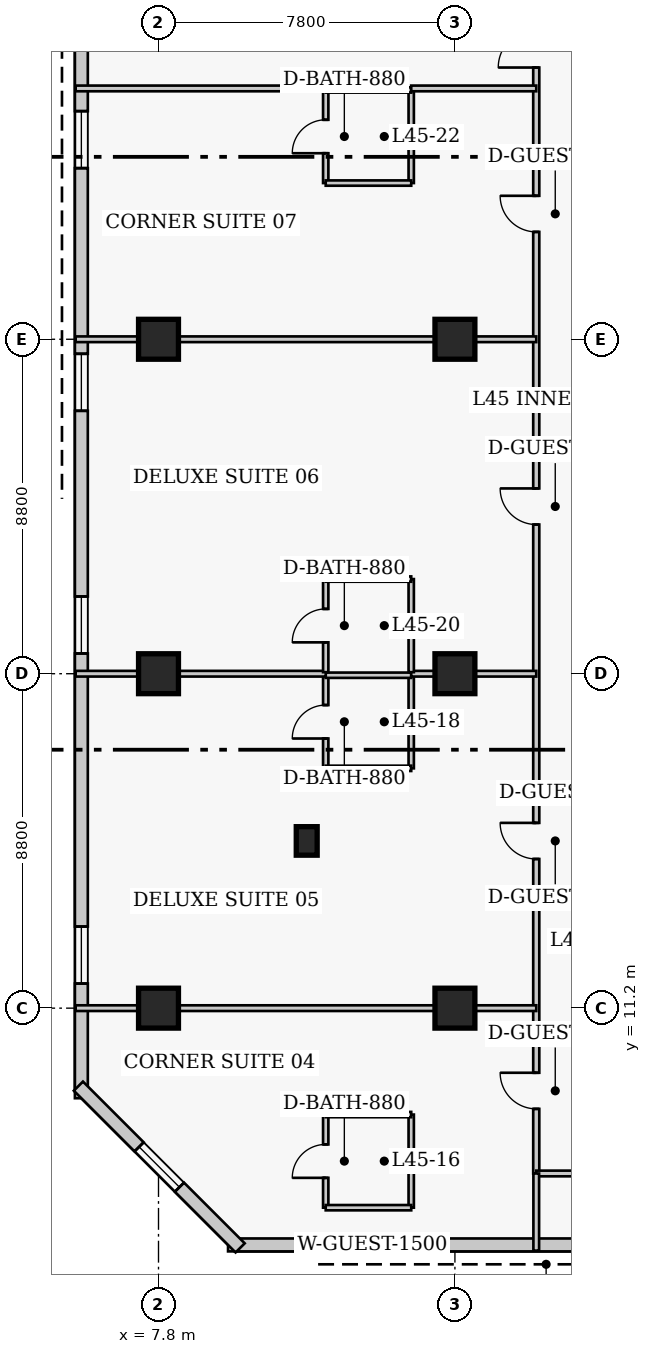
"""IFC4 building model, lengths in metres.
Left out: names, types, materials, properties, quantities, classifications, styles, units other than length and angle.
Written with IfcOpenShell. Run it as: python <this file> out.ifc"""

import sys

from ifc_helpers import new_model, si_unit, direction, frame, frame_2d, origin, origin_2d, place, context, subcontext, project, spatial, rectangle, extrude, element, fill, save


model = new_model("IFC4")
c1 = context("Model", 3, precision=1e-05, world=origin(), true_north=direction((0.0, 1.0)))
c2 = subcontext(c1, "Body", "Model", "MODEL_VIEW")
j1 = project(units=[si_unit("LENGTHUNIT", "METRE"), si_unit("PLANEANGLEUNIT", "RADIAN")], contexts=[c1])
p1 = place(None, origin())
s1 = spatial("IfcSite", under=j1, at=p1, CompositionType="ELEMENT")
p2 = place(p1, origin())
s2 = spatial("IfcBuilding", under=s1, at=p2, CompositionType="ELEMENT")
p3 = place(p2, frame((0.0, 0.0, 180.2)))
s3 = spatial("IfcBuildingStorey", under=s2, at=p3, CompositionType="ELEMENT", Elevation=180.2)
for number, where, z_axis, x_axis in (
    (1, (7.8, 11.2, 0.0), (0.0, 0.0, 1.0), (1.0, 0.0, 0.0)),
    (2, (7.8, 20.0, 0.0), (0.0, 0.0, 1.0), (1.0, 0.0, 0.0)),
    (3, (7.8, 28.8, 0.0), (0.0, 0.0, 1.0), (1.0, 0.0, 0.0)),
    (4, (15.6, 11.2, 0.0), (0.0, 0.0, 1.0), (1.0, 0.0, 0.0)),
    (5, (15.6, 20.0, 0.0), (0.0, 0.0, 1.0), (1.0, 0.0, 0.0)),
    (6, (15.6, 28.8, 0.0), (0.0, 0.0, 1.0), (1.0, 0.0, 0.0)),
):
    element("IfcColumn", number, at=place(p3, frame(where, z_axis=z_axis, x_axis=x_axis)), inside=s3, PredefinedType="COLUMN", context=c2, shape_type="SweptSolid", body=[
        extrude(rectangle(XDim=1.05, YDim=1.05, at=origin_2d()), origin(), (0.0, 0.0, 1.0), 3.8),
    ])
p4 = place(p3, frame((11.7, 15.6, 0.0), z_axis=(0.0, 0.0, 1.0), x_axis=(1.0, 0.0, 0.0)))
e7 = element("IfcColumn", 7, at=p4, inside=s3, PredefinedType="PILASTER", context=c2, shape_type="SweptSolid", body=[
    extrude(rectangle(XDim=0.55, YDim=0.75, at=origin_2d()), origin(), (0.0, 0.0, 1.0), 3.8),
])
p5 = place(p3, frame((9.63, 4.97, 0.0), z_axis=(0.0, 0.0, 1.0), x_axis=(1.0, 0.0, 0.0)))
e8 = element("IfcWall", 8, at=p5, inside=s3, PredefinedType="SOLIDWALL", context=c2, shape_type="SweptSolid", body=[
    extrude(rectangle(XDim=26.69, YDim=0.34, at=frame_2d((13.345, 0.0))), origin(), (0.0, 0.0, 1.0), 3.42),
])
p6 = place(p5, frame((3.048, 0.0, 0.85)))
e9 = element("IfcOpeningElement", 9, at=p6, cuts=e8, PredefinedType="OPENING", context=c2, shape_type="SweptSolid", body=[
    extrude(rectangle(XDim=1.5, YDim=1.75, at=frame_2d((0.75, 0.875))), frame((0.0, 0.18, 0.0), z_axis=(0.0, -1.0, 0.0), x_axis=(1.0, 0.0, 0.0)), (0.0, 0.0, 1.0), 0.36),
])
p7 = place(p5, frame((22.642, 0.0, 0.85)))
e10 = element("IfcOpeningElement", 10, at=p7, cuts=e8, PredefinedType="OPENING", context=c2, shape_type="SweptSolid", body=[
    extrude(rectangle(XDim=1.5, YDim=1.75, at=frame_2d((0.75, 0.875))), frame((0.0, 0.18, 0.0), z_axis=(0.0, -1.0, 0.0), x_axis=(1.0, 0.0, 0.0)), (0.0, 0.0, 1.0), 0.36),
])
p8 = place(p3, frame((5.77, 38.97, 0.0), z_axis=(0.0, 0.0, 1.0), x_axis=(0.0, -1.0, 0.0)))
e11 = element("IfcWall", 11, at=p8, inside=s3, PredefinedType="SOLIDWALL", context=c2, shape_type="SweptSolid", body=[
    extrude(rectangle(XDim=30.14, YDim=0.34, at=frame_2d((15.07, 0.0))), origin(), (0.0, 0.0, 1.0), 3.42),
])
p9 = place(p8, frame((4.167, 0.0, 0.85)))
e12 = element("IfcOpeningElement", 12, at=p9, cuts=e11, PredefinedType="OPENING", context=c2, shape_type="SweptSolid", body=[
    extrude(rectangle(XDim=1.5, YDim=1.75, at=frame_2d((0.75, 0.875))), frame((0.0, 0.18, 0.0), z_axis=(0.0, -1.0, 0.0), x_axis=(1.0, 0.0, 0.0)), (0.0, 0.0, 1.0), 0.36),
])
p10 = place(p8, frame((10.552, 0.0, 0.85)))
e13 = element("IfcOpeningElement", 13, at=p10, cuts=e11, PredefinedType="OPENING", context=c2, shape_type="SweptSolid", body=[
    extrude(rectangle(XDim=1.5, YDim=1.75, at=frame_2d((0.75, 0.875))), frame((0.0, 0.18, 0.0), z_axis=(0.0, -1.0, 0.0), x_axis=(1.0, 0.0, 0.0)), (0.0, 0.0, 1.0), 0.36),
])
p11 = place(p8, frame((16.938, 0.0, 0.85)))
e14 = element("IfcOpeningElement", 14, at=p11, cuts=e11, PredefinedType="OPENING", context=c2, shape_type="SweptSolid", body=[
    extrude(rectangle(XDim=1.5, YDim=1.75, at=frame_2d((0.75, 0.875))), frame((0.0, 0.18, 0.0), z_axis=(0.0, -1.0, 0.0), x_axis=(1.0, 0.0, 0.0)), (0.0, 0.0, 1.0), 0.36),
])
p12 = place(p8, frame((25.623, 0.0, 0.85)))
e15 = element("IfcOpeningElement", 15, at=p12, cuts=e11, PredefinedType="OPENING", context=c2, shape_type="SweptSolid", body=[
    extrude(rectangle(XDim=1.5, YDim=1.75, at=frame_2d((0.75, 0.875))), frame((0.0, 0.18, 0.0), z_axis=(0.0, -1.0, 0.0), x_axis=(1.0, 0.0, 0.0)), (0.0, 0.0, 1.0), 0.36),
])
p13 = place(p3, frame((5.692, 9.148, 0.0), z_axis=(0.0, 0.0, 1.0), x_axis=(0.707106781187, -0.707106781187, 0.0)))
e16 = element("IfcWall", 16, at=p13, inside=s3, PredefinedType="SOLIDWALL", context=c2, shape_type="SweptSolid", body=[
    extrude(rectangle(XDim=6.02, YDim=0.34, at=frame_2d((3.01, 0.0))), origin(), (0.0, 0.0, 1.0), 3.42),
])
p14 = place(p13, frame((2.26, 0.0, 0.85)))
e17 = element("IfcOpeningElement", 17, at=p14, cuts=e16, PredefinedType="OPENING", context=c2, shape_type="SweptSolid", body=[
    extrude(rectangle(XDim=1.5, YDim=1.75, at=frame_2d((0.75, 0.875))), frame((0.0, 0.18, 0.0), z_axis=(0.0, -1.0, 0.0), x_axis=(1.0, 0.0, 0.0)), (0.0, 0.0, 1.0), 0.36),
])
p15 = place(p3, frame((17.74, 6.85, 0.0), z_axis=(0.0, 0.0, 1.0), x_axis=(0.0, 1.0, 0.0)))
e18 = element("IfcWall", 18, at=p15, inside=s3, PredefinedType="PARTITIONING", context=c2, shape_type="SweptSolid", body=[
    extrude(rectangle(XDim=33.8, YDim=0.16, at=frame_2d((16.9, 0.0))), origin(), (0.0, 0.0, 1.0), 3.42),
])
p16 = place(p15, frame((1.7, 0.0, 0.0)))
e19 = element("IfcOpeningElement", 19, at=p16, cuts=e18, PredefinedType="OPENING", context=c2, shape_type="SweptSolid", body=[
    extrude(rectangle(XDim=0.95, YDim=2.1, at=frame_2d((0.475, 1.05))), frame((0.0, 0.09, 0.0), z_axis=(0.0, -1.0, 0.0), x_axis=(1.0, 0.0, 0.0)), (0.0, 0.0, 1.0), 0.18),
])
p17 = place(p15, frame((8.275, 0.0, 0.0)))
e20 = element("IfcOpeningElement", 20, at=p17, cuts=e18, PredefinedType="OPENING", context=c2, shape_type="SweptSolid", body=[
    extrude(rectangle(XDim=0.95, YDim=2.1, at=frame_2d((0.475, 1.05))), frame((0.0, 0.09, 0.0), z_axis=(0.0, -1.0, 0.0), x_axis=(1.0, 0.0, 0.0)), (0.0, 0.0, 1.0), 0.18),
])
p18 = place(p15, frame((17.075, 0.0, 0.0)))
e21 = element("IfcOpeningElement", 21, at=p18, cuts=e18, PredefinedType="OPENING", context=c2, shape_type="SweptSolid", body=[
    extrude(rectangle(XDim=0.95, YDim=2.1, at=frame_2d((0.475, 1.05))), frame((0.0, 0.09, 0.0), z_axis=(0.0, -1.0, 0.0), x_axis=(1.0, 0.0, 0.0)), (0.0, 0.0, 1.0), 0.18),
])
p19 = place(p15, frame((24.775, 0.0, 0.0)))
e22 = element("IfcOpeningElement", 22, at=p19, cuts=e18, PredefinedType="OPENING", context=c2, shape_type="SweptSolid", body=[
    extrude(rectangle(XDim=0.95, YDim=2.1, at=frame_2d((0.475, 1.05))), frame((0.0, 0.09, 0.0), z_axis=(0.0, -1.0, 0.0), x_axis=(1.0, 0.0, 0.0)), (0.0, 0.0, 1.0), 0.18),
])
p20 = place(p15, frame((29.1, 0.0, 0.0)))
e23 = element("IfcOpeningElement", 23, at=p20, cuts=e18, PredefinedType="OPENING", context=c2, shape_type="SweptSolid", body=[
    extrude(rectangle(XDim=1.0, YDim=2.15, at=frame_2d((0.5, 1.075))), frame((0.0, 0.09, 0.0), z_axis=(0.0, -1.0, 0.0), x_axis=(1.0, 0.0, 0.0)), (0.0, 0.0, 1.0), 0.18),
])
p21 = place(p3, frame((17.74, 6.85, 0.0), z_axis=(0.0, 0.0, 1.0), x_axis=(1.0, 0.0, 0.0)))
e24 = element("IfcWall", 24, at=p21, inside=s3, PredefinedType="PARTITIONING", context=c2, shape_type="SweptSolid", body=[
    extrude(rectangle(XDim=2.22, YDim=0.15, at=frame_2d((1.11, 0.0))), origin(), (0.0, 0.0, 1.0), 3.42),
])
p22 = place(p3, frame((17.74, 4.82, 0.0), z_axis=(0.0, 0.0, 1.0), x_axis=(0.0, 1.0, 0.0)))
e25 = element("IfcWall", 25, at=p22, inside=s3, PredefinedType="PARTITIONING", context=c2, shape_type="SweptSolid", body=[
    extrude(rectangle(XDim=2.03, YDim=0.15, at=frame_2d((1.015, 0.0))), origin(), (0.0, 0.0, 1.0), 3.42),
])
p23 = place(p3, frame((12.2, 5.95, 0.0), z_axis=(0.0, 0.0, 1.0), x_axis=(0.0, 1.0, 0.0)))
e26 = element("IfcWall", 26, at=p23, inside=s3, PredefinedType="PLUMBINGWALL", context=c2, shape_type="SweptSolid", body=[
    extrude(rectangle(XDim=2.45, YDim=0.14, at=frame_2d((1.225, 0.0))), origin(), (0.0, 0.0, 1.0), 3.42),
])
p24 = place(p23, frame((0.785, 0.0, 0.0)))
e27 = element("IfcOpeningElement", 27, at=p24, cuts=e26, PredefinedType="OPENING", context=c2, shape_type="SweptSolid", body=[
    extrude(rectangle(XDim=0.88, YDim=2.05, at=frame_2d((0.44, 1.025))), frame((0.0, 0.08, 0.0), z_axis=(0.0, -1.0, 0.0), x_axis=(1.0, 0.0, 0.0)), (0.0, 0.0, 1.0), 0.16),
])
p25 = place(p3, frame((14.45, 5.95, 0.0), z_axis=(0.0, 0.0, 1.0), x_axis=(0.0, 1.0, 0.0)))
e28 = element("IfcWall", 28, at=p25, inside=s3, PredefinedType="PLUMBINGWALL", context=c2, shape_type="SweptSolid", body=[
    extrude(rectangle(XDim=2.45, YDim=0.14, at=frame_2d((1.225, 0.0))), origin(), (0.0, 0.0, 1.0), 3.42),
])
for number, where, z_axis, x_axis in (
    (29, (12.2, 5.95, 0.0), (0.0, 0.0, 1.0), (1.0, 0.0, 0.0)),
    (30, (12.2, 8.4, 0.0), (0.0, 0.0, 1.0), (1.0, 0.0, 0.0)),
):
    element("IfcWall", number, at=place(p3, frame(where, z_axis=z_axis, x_axis=x_axis)), inside=s3, PredefinedType="PLUMBINGWALL", context=c2, shape_type="SweptSolid", body=[
        extrude(rectangle(XDim=2.25, YDim=0.14, at=frame_2d((1.125, 0.0))), origin(), (0.0, 0.0, 1.0), 3.42),
    ])
p26 = place(p3, frame((5.62, 11.2, 0.0), z_axis=(0.0, 0.0, 1.0), x_axis=(1.0, 0.0, 0.0)))
e31 = element("IfcWall", 31, at=p26, inside=s3, PredefinedType="PARTITIONING", context=c2, shape_type="SweptSolid", body=[
    extrude(rectangle(XDim=12.12, YDim=0.15, at=frame_2d((6.06, 0.0))), origin(), (0.0, 0.0, 1.0), 2.648),
])
p27 = place(p3, frame((12.2, 17.51, 0.0), z_axis=(0.0, 0.0, 1.0), x_axis=(0.0, 1.0, 0.0)))
e32 = element("IfcWall", 32, at=p27, inside=s3, PredefinedType="PLUMBINGWALL", context=c2, shape_type="SweptSolid", body=[
    extrude(rectangle(XDim=2.45, YDim=0.14, at=frame_2d((1.225, 0.0))), origin(), (0.0, 0.0, 1.0), 3.42),
])
p28 = place(p27, frame((0.785, 0.0, 0.0)))
e33 = element("IfcOpeningElement", 33, at=p28, cuts=e32, PredefinedType="OPENING", context=c2, shape_type="SweptSolid", body=[
    extrude(rectangle(XDim=0.88, YDim=2.05, at=frame_2d((0.44, 1.025))), frame((0.0, 0.08, 0.0), z_axis=(0.0, -1.0, 0.0), x_axis=(1.0, 0.0, 0.0)), (0.0, 0.0, 1.0), 0.16),
])
p29 = place(p3, frame((14.45, 17.51, 0.0), z_axis=(0.0, 0.0, 1.0), x_axis=(0.0, 1.0, 0.0)))
e34 = element("IfcWall", 34, at=p29, inside=s3, PredefinedType="PLUMBINGWALL", context=c2, shape_type="SweptSolid", body=[
    extrude(rectangle(XDim=2.45, YDim=0.14, at=frame_2d((1.225, 0.0))), origin(), (0.0, 0.0, 1.0), 3.42),
])
p30 = place(p3, frame((12.2, 17.51, 0.0), z_axis=(0.0, 0.0, 1.0), x_axis=(1.0, 0.0, 0.0)))
e35 = element("IfcWall", 35, at=p30, inside=s3, PredefinedType="PLUMBINGWALL", context=c2, shape_type="SweptSolid", body=[
    extrude(rectangle(XDim=2.25, YDim=0.14, at=frame_2d((1.125, 0.0))), origin(), (0.0, 0.0, 1.0), 3.42),
])
p31 = place(p3, frame((12.2, 19.96, 0.0), z_axis=(0.0, 0.0, 1.0), x_axis=(1.0, 0.0, 0.0)))
e36 = element("IfcWall", 36, at=p31, inside=s3, PredefinedType="PLUMBINGWALL", context=c2, shape_type="SweptSolid", body=[
    extrude(rectangle(XDim=2.25, YDim=0.14, at=frame_2d((1.125, 0.0))), origin(), (0.0, 0.0, 1.0), 2.77),
])
p32 = place(p3, frame((5.62, 20.0, 0.0), z_axis=(0.0, 0.0, 1.0), x_axis=(1.0, 0.0, 0.0)))
e37 = element("IfcWall", 37, at=p32, inside=s3, PredefinedType="PARTITIONING", context=c2, shape_type="SweptSolid", body=[
    extrude(rectangle(XDim=6.58, YDim=0.15, at=frame_2d((3.29, 0.0))), origin(), (0.0, 0.0, 1.0), 2.648),
])
p33 = place(p3, frame((14.45, 20.0, 0.0), z_axis=(0.0, 0.0, 1.0), x_axis=(1.0, 0.0, 0.0)))
e38 = element("IfcWall", 38, at=p33, inside=s3, PredefinedType="PARTITIONING", context=c2, shape_type="SweptSolid", body=[
    extrude(rectangle(XDim=3.29, YDim=0.15, at=frame_2d((1.645, 0.0))), origin(), (0.0, 0.0, 1.0), 2.648),
])
p34 = place(p3, frame((12.2, 20.04, 0.0), z_axis=(0.0, 0.0, 1.0), x_axis=(0.0, 1.0, 0.0)))
e39 = element("IfcWall", 39, at=p34, inside=s3, PredefinedType="PLUMBINGWALL", context=c2, shape_type="SweptSolid", body=[
    extrude(rectangle(XDim=2.45, YDim=0.14, at=frame_2d((1.225, 0.0))), origin(), (0.0, 0.0, 1.0), 3.42),
])
p35 = place(p34, frame((0.785, 0.0, 0.0)))
e40 = element("IfcOpeningElement", 40, at=p35, cuts=e39, PredefinedType="OPENING", context=c2, shape_type="SweptSolid", body=[
    extrude(rectangle(XDim=0.88, YDim=2.05, at=frame_2d((0.44, 1.025))), frame((0.0, 0.08, 0.0), z_axis=(0.0, -1.0, 0.0), x_axis=(1.0, 0.0, 0.0)), (0.0, 0.0, 1.0), 0.16),
])
p36 = place(p3, frame((14.45, 20.04, 0.0), z_axis=(0.0, 0.0, 1.0), x_axis=(0.0, 1.0, 0.0)))
e41 = element("IfcWall", 41, at=p36, inside=s3, PredefinedType="PLUMBINGWALL", context=c2, shape_type="SweptSolid", body=[
    extrude(rectangle(XDim=2.45, YDim=0.14, at=frame_2d((1.225, 0.0))), origin(), (0.0, 0.0, 1.0), 3.42),
])
p37 = place(p3, frame((12.2, 22.49, 0.0), z_axis=(0.0, 0.0, 1.0), x_axis=(1.0, 0.0, 0.0)))
e42 = element("IfcWall", 42, at=p37, inside=s3, PredefinedType="PLUMBINGWALL", context=c2, shape_type="SweptSolid", body=[
    extrude(rectangle(XDim=2.25, YDim=0.14, at=frame_2d((1.125, 0.0))), origin(), (0.0, 0.0, 1.0), 3.42),
])
p38 = place(p3, frame((5.62, 28.8, 0.0), z_axis=(0.0, 0.0, 1.0), x_axis=(1.0, 0.0, 0.0)))
e43 = element("IfcWall", 43, at=p38, inside=s3, PredefinedType="PARTITIONING", context=c2, shape_type="SweptSolid", body=[
    extrude(rectangle(XDim=12.12, YDim=0.15, at=frame_2d((6.06, 0.0))), origin(), (0.0, 0.0, 1.0), 2.648),
])
p39 = place(p3, frame((12.2, 32.91, 0.0), z_axis=(0.0, 0.0, 1.0), x_axis=(0.0, 1.0, 0.0)))
e44 = element("IfcWall", 44, at=p39, inside=s3, PredefinedType="PLUMBINGWALL", context=c2, shape_type="SweptSolid", body=[
    extrude(rectangle(XDim=2.45, YDim=0.14, at=frame_2d((1.225, 0.0))), origin(), (0.0, 0.0, 1.0), 3.42),
])
p40 = place(p39, frame((0.785, 0.0, 0.0)))
e45 = element("IfcOpeningElement", 45, at=p40, cuts=e44, PredefinedType="OPENING", context=c2, shape_type="SweptSolid", body=[
    extrude(rectangle(XDim=0.88, YDim=2.05, at=frame_2d((0.44, 1.025))), frame((0.0, 0.08, 0.0), z_axis=(0.0, -1.0, 0.0), x_axis=(1.0, 0.0, 0.0)), (0.0, 0.0, 1.0), 0.16),
])
p41 = place(p3, frame((14.45, 32.91, 0.0), z_axis=(0.0, 0.0, 1.0), x_axis=(0.0, 1.0, 0.0)))
e46 = element("IfcWall", 46, at=p41, inside=s3, PredefinedType="PLUMBINGWALL", context=c2, shape_type="SweptSolid", body=[
    extrude(rectangle(XDim=2.45, YDim=0.14, at=frame_2d((1.225, 0.0))), origin(), (0.0, 0.0, 1.0), 3.42),
])
for number, where, z_axis, x_axis in (
    (47, (12.2, 32.91, 0.0), (0.0, 0.0, 1.0), (1.0, 0.0, 0.0)),
    (48, (12.2, 35.36, 0.0), (0.0, 0.0, 1.0), (1.0, 0.0, 0.0)),
):
    element("IfcWall", number, at=place(p3, frame(where, z_axis=z_axis, x_axis=x_axis)), inside=s3, PredefinedType="PLUMBINGWALL", context=c2, shape_type="SweptSolid", body=[
        extrude(rectangle(XDim=2.25, YDim=0.14, at=frame_2d((1.125, 0.0))), origin(), (0.0, 0.0, 1.0), 3.42),
    ])
p42 = place(p3, frame((5.62, 35.4, 0.0), z_axis=(0.0, 0.0, 1.0), x_axis=(1.0, 0.0, 0.0)))
e49 = element("IfcWall", 49, at=p42, inside=s3, PredefinedType="PARTITIONING", context=c2, shape_type="SweptSolid", body=[
    extrude(rectangle(XDim=6.58, YDim=0.15, at=frame_2d((3.29, 0.0))), origin(), (0.0, 0.0, 1.0), 3.42),
])
p43 = place(p3, frame((14.45, 35.4, 0.0), z_axis=(0.0, 0.0, 1.0), x_axis=(1.0, 0.0, 0.0)))
e50 = element("IfcWall", 50, at=p43, inside=s3, PredefinedType="PARTITIONING", context=c2, shape_type="SweptSolid", body=[
    extrude(rectangle(XDim=3.29, YDim=0.15, at=frame_2d((1.645, 0.0))), origin(), (0.0, 0.0, 1.0), 3.42),
])
p44 = place(p6, origin())
e51 = element("IfcWindow", 51, at=p44, inside=s3, PartitioningType="SINGLE_PANEL", PredefinedType="WINDOW", context=c2, shape_type="SweptSolid", body=[
    extrude(rectangle(XDim=1.5, YDim=1.75, at=frame_2d((0.75, 0.875))), frame((0.0, 0.03, 0.0), z_axis=(0.0, -1.0, 0.0), x_axis=(1.0, 0.0, 0.0)), (0.0, 0.0, 1.0), 0.06),
])
fill(e9, e51)
p45 = place(p9, origin())
e52 = element("IfcWindow", 52, at=p45, inside=s3, PartitioningType="SINGLE_PANEL", PredefinedType="WINDOW", context=c2, shape_type="SweptSolid", body=[
    extrude(rectangle(XDim=1.5, YDim=1.75, at=frame_2d((0.75, 0.875))), frame((0.0, 0.03, 0.0), z_axis=(0.0, -1.0, 0.0), x_axis=(1.0, 0.0, 0.0)), (0.0, 0.0, 1.0), 0.06),
])
fill(e12, e52)
p46 = place(p10, origin())
e53 = element("IfcWindow", 53, at=p46, inside=s3, PartitioningType="SINGLE_PANEL", PredefinedType="WINDOW", context=c2, shape_type="SweptSolid", body=[
    extrude(rectangle(XDim=1.5, YDim=1.75, at=frame_2d((0.75, 0.875))), frame((0.0, 0.03, 0.0), z_axis=(0.0, -1.0, 0.0), x_axis=(1.0, 0.0, 0.0)), (0.0, 0.0, 1.0), 0.06),
])
fill(e13, e53)
p47 = place(p11, origin())
e54 = element("IfcWindow", 54, at=p47, inside=s3, PartitioningType="SINGLE_PANEL", PredefinedType="WINDOW", context=c2, shape_type="SweptSolid", body=[
    extrude(rectangle(XDim=1.5, YDim=1.75, at=frame_2d((0.75, 0.875))), frame((0.0, 0.03, 0.0), z_axis=(0.0, -1.0, 0.0), x_axis=(1.0, 0.0, 0.0)), (0.0, 0.0, 1.0), 0.06),
])
fill(e14, e54)
p48 = place(p12, origin())
e55 = element("IfcWindow", 55, at=p48, inside=s3, PartitioningType="SINGLE_PANEL", PredefinedType="WINDOW", context=c2, shape_type="SweptSolid", body=[
    extrude(rectangle(XDim=1.5, YDim=1.75, at=frame_2d((0.75, 0.875))), frame((0.0, 0.03, 0.0), z_axis=(0.0, -1.0, 0.0), x_axis=(1.0, 0.0, 0.0)), (0.0, 0.0, 1.0), 0.06),
])
fill(e15, e55)
p49 = place(p14, origin())
e56 = element("IfcWindow", 56, at=p49, inside=s3, PartitioningType="SINGLE_PANEL", PredefinedType="WINDOW", context=c2, shape_type="SweptSolid", body=[
    extrude(rectangle(XDim=1.5, YDim=1.75, at=frame_2d((0.75, 0.875))), frame((0.0, 0.03, 0.0), z_axis=(0.0, -1.0, 0.0), x_axis=(1.0, 0.0, 0.0)), (0.0, 0.0, 1.0), 0.06),
])
fill(e17, e56)
p50 = place(p24, origin())
e57 = element("IfcDoor", 57, at=p50, inside=s3, OperationType="SINGLE_SWING_LEFT", PredefinedType="DOOR", context=c2, shape_type="SweptSolid", body=[
    extrude(rectangle(XDim=0.88, YDim=2.05, at=frame_2d((0.44, 1.025))), frame((0.0, 0.025, 0.0), z_axis=(0.0, -1.0, 0.0), x_axis=(1.0, 0.0, 0.0)), (0.0, 0.0, 1.0), 0.05),
])
fill(e27, e57)
p51 = place(p16, origin())
e58 = element("IfcDoor", 58, at=p51, inside=s3, OperationType="SINGLE_SWING_RIGHT", PredefinedType="DOOR", context=c2, shape_type="SweptSolid", body=[
    extrude(rectangle(XDim=0.95, YDim=2.1, at=frame_2d((0.475, 1.05))), frame((0.0, 0.025, 0.0), z_axis=(0.0, -1.0, 0.0), x_axis=(1.0, 0.0, 0.0)), (0.0, 0.0, 1.0), 0.05),
])
fill(e19, e58)
p52 = place(p28, origin())
e59 = element("IfcDoor", 59, at=p52, inside=s3, OperationType="SINGLE_SWING_LEFT", PredefinedType="DOOR", context=c2, shape_type="SweptSolid", body=[
    extrude(rectangle(XDim=0.88, YDim=2.05, at=frame_2d((0.44, 1.025))), frame((0.0, 0.025, 0.0), z_axis=(0.0, -1.0, 0.0), x_axis=(1.0, 0.0, 0.0)), (0.0, 0.0, 1.0), 0.05),
])
fill(e33, e59)
p53 = place(p17, origin())
e60 = element("IfcDoor", 60, at=p53, inside=s3, OperationType="SINGLE_SWING_RIGHT", PredefinedType="DOOR", context=c2, shape_type="SweptSolid", body=[
    extrude(rectangle(XDim=0.95, YDim=2.1, at=frame_2d((0.475, 1.05))), frame((0.0, 0.025, 0.0), z_axis=(0.0, -1.0, 0.0), x_axis=(1.0, 0.0, 0.0)), (0.0, 0.0, 1.0), 0.05),
])
fill(e20, e60)
p54 = place(p35, origin())
e61 = element("IfcDoor", 61, at=p54, inside=s3, OperationType="SINGLE_SWING_LEFT", PredefinedType="DOOR", context=c2, shape_type="SweptSolid", body=[
    extrude(rectangle(XDim=0.88, YDim=2.05, at=frame_2d((0.44, 1.025))), frame((0.0, 0.025, 0.0), z_axis=(0.0, -1.0, 0.0), x_axis=(1.0, 0.0, 0.0)), (0.0, 0.0, 1.0), 0.05),
])
fill(e40, e61)
p55 = place(p18, origin())
e62 = element("IfcDoor", 62, at=p55, inside=s3, OperationType="SINGLE_SWING_RIGHT", PredefinedType="DOOR", context=c2, shape_type="SweptSolid", body=[
    extrude(rectangle(XDim=0.95, YDim=2.1, at=frame_2d((0.475, 1.05))), frame((0.0, 0.025, 0.0), z_axis=(0.0, -1.0, 0.0), x_axis=(1.0, 0.0, 0.0)), (0.0, 0.0, 1.0), 0.05),
])
fill(e21, e62)
p56 = place(p40, origin())
e63 = element("IfcDoor", 63, at=p56, inside=s3, OperationType="SINGLE_SWING_LEFT", PredefinedType="DOOR", context=c2, shape_type="SweptSolid", body=[
    extrude(rectangle(XDim=0.88, YDim=2.05, at=frame_2d((0.44, 1.025))), frame((0.0, 0.025, 0.0), z_axis=(0.0, -1.0, 0.0), x_axis=(1.0, 0.0, 0.0)), (0.0, 0.0, 1.0), 0.05),
])
fill(e45, e63)
p57 = place(p19, origin())
e64 = element("IfcDoor", 64, at=p57, inside=s3, OperationType="SINGLE_SWING_RIGHT", PredefinedType="DOOR", context=c2, shape_type="SweptSolid", body=[
    extrude(rectangle(XDim=0.95, YDim=2.1, at=frame_2d((0.475, 1.05))), frame((0.0, 0.025, 0.0), z_axis=(0.0, -1.0, 0.0), x_axis=(1.0, 0.0, 0.0)), (0.0, 0.0, 1.0), 0.05),
])
fill(e22, e64)
p58 = place(p20, origin())
e65 = element("IfcDoor", 65, at=p58, inside=s3, OperationType="SINGLE_SWING_LEFT", PredefinedType="DOOR", context=c2, shape_type="SweptSolid", body=[
    extrude(rectangle(XDim=1.0, YDim=2.15, at=frame_2d((0.5, 1.075))), frame((0.0, 0.025, 0.0), z_axis=(0.0, -1.0, 0.0), x_axis=(1.0, 0.0, 0.0)), (0.0, 0.0, 1.0), 0.05),
])
fill(e23, e65)
save(model, sys.argv[1])
